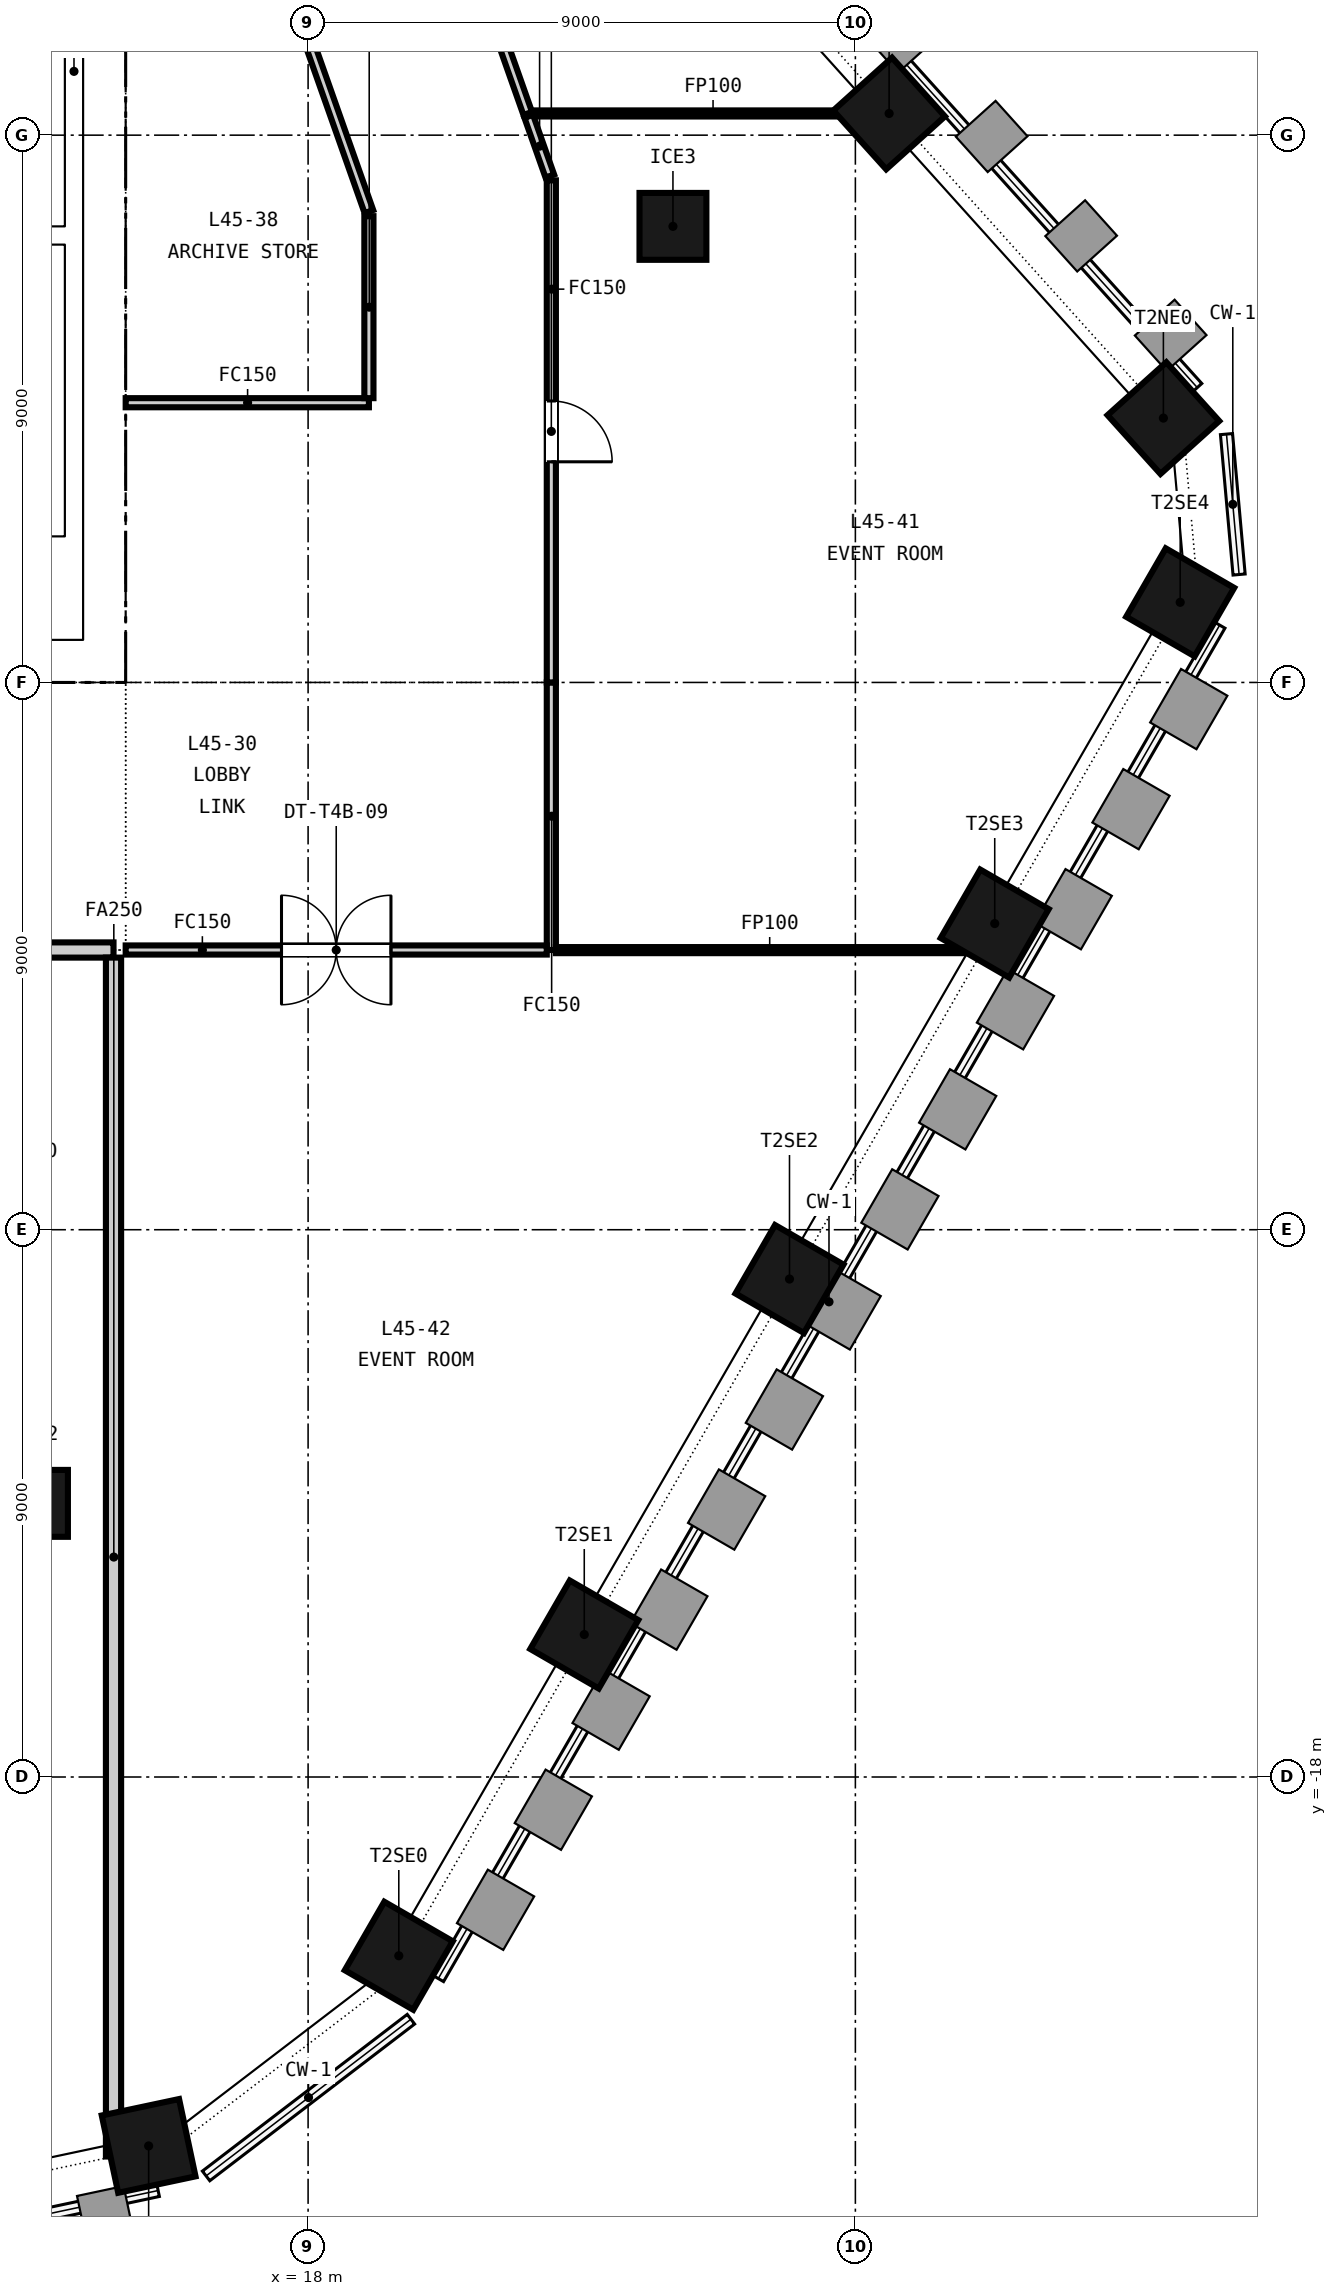
"""IFC4 building model, lengths in metres.
Left out: names, types, materials, properties, quantities, classifications, styles, units other than length and angle.
Written with IfcOpenShell. Run it as: python <this file> out.ifc"""

import sys

from ifc_helpers import new_model, si_unit, direction, frame, frame_2d, origin, origin_2d, place, context, subcontext, project, spatial, rectangle, extrude, element, fill, save


model = new_model("IFC4")
c1 = context("Model", 3, precision=1e-05, world=origin(), true_north=direction((0.0, 1.0)))
c2 = subcontext(c1, "Body", "Model", "MODEL_VIEW")
j1 = project(units=[si_unit("LENGTHUNIT", "METRE"), si_unit("PLANEANGLEUNIT", "RADIAN")], contexts=[c1])
p1 = place(None, origin())
s1 = spatial("IfcSite", under=j1, at=p1, CompositionType="ELEMENT")
p2 = place(p1, origin())
s2 = spatial("IfcBuilding", under=s1, at=p2, CompositionType="ELEMENT")
p3 = place(p2, frame((0.0, 0.0, 181.75)))
s3 = spatial("IfcBuildingStorey", under=s2, at=p3, CompositionType="ELEMENT", Elevation=181.75)
p4 = place(p3, frame((-15.0, 0.35, -0.15), z_axis=(0.0, 0.0, 1.0), x_axis=(1.0, 0.0, 0.0)))
e1 = element("IfcWall", 1, at=p4, inside=s3, PredefinedType="SOLIDWALL", context=c2, shape_type="SweptSolid", body=[
    extrude(rectangle(XDim=30.0, YDim=0.7, at=frame_2d((15.0, 0.0))), origin(), (0.0, 0.0, 1.0), 3.65),
])
p5 = place(p4, frame((5.8, 0.0, 0.15)))
e2 = element("IfcOpeningElement", 2, at=p5, cuts=e1, PredefinedType="OPENING", context=c2, shape_type="SweptSolid", body=[
    extrude(rectangle(XDim=2.4, YDim=2.4, at=frame_2d((1.2, 1.2))), frame((0.0, 0.36, 0.0), z_axis=(0.0, -1.0, 0.0), x_axis=(1.0, 0.0, 0.0)), (0.0, 0.0, 1.0), 0.72),
])
p6 = place(p4, frame((13.8, 0.0, 0.15)))
e3 = element("IfcOpeningElement", 3, at=p6, cuts=e1, PredefinedType="OPENING", context=c2, shape_type="SweptSolid", body=[
    extrude(rectangle(XDim=2.4, YDim=2.4, at=frame_2d((1.2, 1.2))), frame((0.0, 0.36, 0.0), z_axis=(0.0, -1.0, 0.0), x_axis=(1.0, 0.0, 0.0)), (0.0, 0.0, 1.0), 0.72),
])
p7 = place(p4, frame((21.8, 0.0, 0.15)))
e4 = element("IfcOpeningElement", 4, at=p7, cuts=e1, PredefinedType="OPENING", context=c2, shape_type="SweptSolid", body=[
    extrude(rectangle(XDim=2.4, YDim=2.4, at=frame_2d((1.2, 1.2))), frame((0.0, 0.36, 0.0), z_axis=(0.0, -1.0, 0.0), x_axis=(1.0, 0.0, 0.0)), (0.0, 0.0, 1.0), 0.72),
])
p8 = place(p4, frame((1.5, 0.0, 0.15)))
e5 = element("IfcOpeningElement", 5, at=p8, cuts=e1, PredefinedType="OPENING", context=c2, shape_type="SweptSolid", body=[
    extrude(rectangle(XDim=1.2, YDim=2.1, at=frame_2d((0.6, 1.05))), frame((0.0, 0.36, 0.0), z_axis=(0.0, -1.0, 0.0), x_axis=(1.0, 0.0, 0.0)), (0.0, 0.0, 1.0), 0.72),
])
p9 = place(p4, frame((27.3, 0.0, 0.15)))
e6 = element("IfcOpeningElement", 6, at=p9, cuts=e1, PredefinedType="OPENING", context=c2, shape_type="SweptSolid", body=[
    extrude(rectangle(XDim=1.2, YDim=2.1, at=frame_2d((0.6, 1.05))), frame((0.0, 0.36, 0.0), z_axis=(0.0, -1.0, 0.0), x_axis=(1.0, 0.0, 0.0)), (0.0, 0.0, 1.0), 0.72),
])
p10 = place(p3, frame((14.65, 0.7, -0.15), z_axis=(0.0, 0.0, 1.0), x_axis=(0.0, 1.0, 0.0)))
e7 = element("IfcWall", 7, at=p10, inside=s3, PredefinedType="SOLIDWALL", context=c2, shape_type="SweptSolid", body=[
    extrude(rectangle(XDim=13.6, YDim=0.7, at=frame_2d((6.8, 0.0))), origin(), (0.0, 0.0, 1.0), 3.65),
])
for number, where, z_axis, x_axis in (
    (8, (15.378, -24.067, -0.15), (0.0, 0.0, 1.0), (0.978, 0.208, 0.0)),
    (9, (19.491, -20.94, -0.15), (0.0, 0.0, 1.0), (0.5, 0.866, 0.0)),
    (10, (22.542, -15.657, -0.15), (0.0, 0.0, 1.0), (0.5, 0.866, 0.0)),
    (11, (25.917, -9.811, -0.15), (0.0, 0.0, 1.0), (0.5, 0.866, 0.0)),
    (12, (29.292, -3.965, -0.15), (0.0, 0.0, 1.0), (0.5, 0.866, 0.0)),
    (13, (32.342, 1.318, -0.15), (0.0, 0.0, 1.0), (0.5, 0.866, 0.0)),
    (14, (32.065, 4.347, -0.15), (0.0, 0.0, 1.0), (-0.669, 0.743, 0.0)),
    (15, (27.555, 9.357, -0.15), (0.0, 0.0, 1.0), (-0.669, 0.743, 0.0)),
):
    element("IfcColumn", number, at=place(p3, frame(where, z_axis=z_axis, x_axis=x_axis)), inside=s3, PredefinedType="COLUMN", context=c2, shape_type="SweptSolid", body=[
        extrude(rectangle(XDim=1.3, YDim=1.3, at=origin_2d()), origin(), (0.0, 0.0, 1.0), 3.65),
    ])
for number, where, z_axis, x_axis in (
    (16, (13.5, -13.5, -0.15), (0.0, 0.0, 1.0), (1.0, 0.0, 0.0)),
    (17, (24.0, 7.5, -0.15), (0.0, 0.0, 1.0), (1.0, 0.0, 0.0)),
):
    element("IfcColumn", number, at=place(p3, frame(where, z_axis=z_axis, x_axis=x_axis)), inside=s3, PredefinedType="COLUMN", context=c2, shape_type="SweptSolid", body=[
        extrude(rectangle(XDim=1.1, YDim=1.1, at=origin_2d()), origin(), (0.0, 0.0, 1.0), 3.65),
    ])
p11 = place(p3, frame((11.05, 7.35, 0.0), z_axis=(0.0, 0.0, 1.0), x_axis=(1.0, 0.0, 0.0)))
e18 = element("IfcWall", 18, at=p11, inside=s3, PredefinedType="SOLIDWALL", context=c2, shape_type="SweptSolid", body=[
    extrude(rectangle(XDim=2.95, YDim=0.3, at=frame_2d((1.475, 0.0))), origin(), (0.0, 0.0, 1.0), 3.5),
])
p12 = place(p3, frame((14.15, 0.7, 0.0), z_axis=(0.0, 0.0, 1.0), x_axis=(0.0, 1.0, 0.0)))
e19 = element("IfcWall", 19, at=p12, inside=s3, PredefinedType="SOLIDWALL", context=c2, shape_type="SweptSolid", body=[
    extrude(rectangle(XDim=13.6, YDim=0.3, at=frame_2d((6.8, 0.0))), origin(), (0.0, 0.0, 1.0), 3.5),
])
p13 = place(p3, frame((14.8, -4.4, 0.0), z_axis=(0.0, 0.0, 1.0), x_axis=(-1.0, 0.0, 0.0)))
e20 = element("IfcWall", 20, at=p13, inside=s3, PredefinedType="PARTITIONING", context=c2, shape_type="SweptSolid", body=[
    extrude(rectangle(XDim=14.705, YDim=0.25, at=frame_2d((7.353, 0.0))), origin(), (0.0, 0.0, 1.0), 2.741),
])
p14 = place(p13, frame((6.452, 0.0, 0.0)))
e21 = element("IfcOpeningElement", 21, at=p14, cuts=e20, PredefinedType="OPENING", context=c2, shape_type="SweptSolid", body=[
    extrude(rectangle(XDim=1.8, YDim=2.1, at=frame_2d((0.9, 1.05))), frame((0.0, 0.135, 0.0), z_axis=(0.0, -1.0, 0.0), x_axis=(1.0, 0.0, 0.0)), (0.0, 0.0, 1.0), 0.27),
])
p15 = place(p3, frame((22.0, 0.0, 0.0), z_axis=(0.0, 0.0, 1.0), x_axis=(0.0, -1.0, 0.0)))
e22 = element("IfcWall", 22, at=p15, inside=s3, PredefinedType="PARTITIONING", context=c2, shape_type="SweptSolid", body=[
    extrude(rectangle(XDim=4.4, YDim=0.15, at=frame_2d((2.2, 0.0))), origin(), (0.0, 0.0, 1.0), 2.741),
])
p16 = place(p3, frame((21.925, -4.4, 0.0), z_axis=(0.0, 0.0, 1.0), x_axis=(-1.0, 0.0, 0.0)))
e23 = element("IfcWall", 23, at=p16, inside=s3, PredefinedType="PARTITIONING", context=c2, shape_type="SweptSolid", body=[
    extrude(rectangle(XDim=6.925, YDim=0.15, at=frame_2d((3.462, 0.0))), origin(), (0.0, 0.0, 1.0), 2.741),
])
p17 = place(p16, frame((2.562, 0.0, 0.0)))
e24 = element("IfcOpeningElement", 24, at=p17, cuts=e23, PredefinedType="OPENING", context=c2, shape_type="SweptSolid", body=[
    extrude(rectangle(XDim=1.8, YDim=2.1, at=frame_2d((0.9, 1.05))), frame((0.0, 0.085, 0.0), z_axis=(0.0, -1.0, 0.0), x_axis=(1.0, 0.0, 0.0)), (0.0, 0.0, 1.0), 0.17),
])
p18 = place(p3, frame((19.0, 7.743, 0.0), z_axis=(0.0, 0.0, 1.0), x_axis=(-0.332768168026, 0.943008667165, 0.0)))
e25 = element("IfcWall", 25, at=p18, inside=s3, PredefinedType="PARTITIONING", context=c2, shape_type="SweptSolid", body=[
    extrude(rectangle(XDim=7.621, YDim=0.15, at=frame_2d((3.81, 0.0))), origin(), (0.0, 0.0, 1.0), 2.741),
])
p19 = place(p18, frame((3.36, 0.0, 0.0)))
e26 = element("IfcOpeningElement", 26, at=p19, cuts=e25, PredefinedType="OPENING", context=c2, shape_type="SweptSolid", body=[
    extrude(rectangle(XDim=0.9, YDim=2.1, at=frame_2d((0.45, 1.05))), frame((0.0, 0.085, 0.0), z_axis=(0.0, -1.0, 0.0), x_axis=(1.0, 0.0, 0.0)), (0.0, 0.0, 1.0), 0.17),
])
p20 = place(p3, frame((22.0, 8.257, 0.0), z_axis=(0.0, 0.0, 1.0), x_axis=(0.0, -1.0, 0.0)))
e27 = element("IfcWall", 27, at=p20, inside=s3, PredefinedType="PARTITIONING", context=c2, shape_type="SweptSolid", body=[
    extrude(rectangle(XDim=8.257, YDim=0.15, at=frame_2d((4.128, 0.0))), origin(), (0.0, 0.0, 1.0), 2.741),
])
p21 = place(p20, frame((3.628, 0.0, 0.0)))
e28 = element("IfcOpeningElement", 28, at=p21, cuts=e27, PredefinedType="OPENING", context=c2, shape_type="SweptSolid", body=[
    extrude(rectangle(XDim=1.0, YDim=2.1, at=frame_2d((0.5, 1.05))), frame((0.0, 0.085, 0.0), z_axis=(0.0, -1.0, 0.0), x_axis=(1.0, 0.0, 0.0)), (0.0, 0.0, 1.0), 0.17),
])
p22 = place(p3, frame((19.757, 14.611, 0.0), z_axis=(0.0, 0.0, 1.0), x_axis=(0.332898037941, -0.942962828713, 0.0)))
e29 = element("IfcWall", 29, at=p22, inside=s3, PredefinedType="PARTITIONING", context=c2, shape_type="SweptSolid", body=[
    extrude(rectangle(XDim=5.572, YDim=0.15, at=frame_2d((2.786, 0.0))), origin(), (0.0, 0.0, 1.0), 2.741),
])
p23 = place(p3, frame((21.687, 9.357, 0.0), z_axis=(0.0, 0.0, 1.0), x_axis=(1.0, 0.0, 0.0)))
e30 = element("IfcWall", 30, at=p23, inside=s3, PredefinedType="PARTITIONING", context=c2, shape_type="SweptSolid", body=[
    extrude(rectangle(XDim=5.935, YDim=0.1, at=frame_2d((2.968, 0.0))), origin(), (0.0, 0.0, 1.0), 2.741),
])
p24 = place(p3, frame((15.0, 4.6, 0.0), z_axis=(0.0, 0.0, 1.0), x_axis=(1.0, 0.0, 0.0)))
e31 = element("IfcWall", 31, at=p24, inside=s3, PredefinedType="PARTITIONING", context=c2, shape_type="SweptSolid", body=[
    extrude(rectangle(XDim=4.0, YDim=0.15, at=frame_2d((2.0, 0.0))), origin(), (0.0, 0.0, 1.0), 2.741),
])
p25 = place(p3, frame((19.0, 4.675, 0.0), z_axis=(0.0, 0.0, 1.0), x_axis=(0.0, 1.0, 0.0)))
e32 = element("IfcWall", 32, at=p25, inside=s3, PredefinedType="PARTITIONING", context=c2, shape_type="SweptSolid", body=[
    extrude(rectangle(XDim=2.993, YDim=0.15, at=frame_2d((1.497, 0.0))), origin(), (0.0, 0.0, 1.0), 2.741),
])
p26 = place(p3, frame((21.629, 9.31, 0.0), z_axis=(0.0, 0.0, 1.0), x_axis=(0.33263618507, -0.943055230823, 0.0)))
e33 = element("IfcWall", 33, at=p26, inside=s3, PredefinedType="PARTITIONING", context=c2, shape_type="SweptSolid", body=[
    extrude(rectangle(XDim=1.042, YDim=0.15, at=frame_2d((0.521, 0.0))), origin(), (0.0, 0.0, 1.0), 2.741),
])
p27 = place(p3, frame((22.075, -4.402, 0.0), z_axis=(0.0, 0.0, 1.0), x_axis=(1.0, 0.0, 0.0)))
e34 = element("IfcWall", 34, at=p27, inside=s3, PredefinedType="PARTITIONING", context=c2, shape_type="SweptSolid", body=[
    extrude(rectangle(XDim=7.022, YDim=0.1, at=frame_2d((3.511, 0.0))), origin(), (0.0, 0.0, 1.0), 2.741),
])
p28 = place(p3, frame((14.8, -24.241, 0.0), z_axis=(0.0, 0.0, 1.0), x_axis=(0.0, 1.0, 0.0)))
e35 = element("IfcWall", 35, at=p28, inside=s3, PredefinedType="PARTITIONING", context=c2, shape_type="SweptSolid", body=[
    extrude(rectangle(XDim=19.716, YDim=0.25, at=frame_2d((9.858, 0.0))), origin(), (0.0, 0.0, 1.0), 2.741),
])
p29 = place(p21, origin())
e36 = element("IfcDoor", 36, at=p29, inside=s3, OperationType="SINGLE_SWING_RIGHT", PredefinedType="DOOR", context=c2, shape_type="SweptSolid", body=[
    extrude(rectangle(XDim=1.0, YDim=2.1, at=frame_2d((0.5, 1.05))), frame((0.0, 0.025, 0.0), z_axis=(0.0, -1.0, 0.0), x_axis=(1.0, 0.0, 0.0)), (0.0, 0.0, 1.0), 0.05),
])
fill(e28, e36)
p30 = place(p17, origin())
e37 = element("IfcDoor", 37, at=p30, inside=s3, OperationType="DOUBLE_DOOR_DOUBLE_SWING", PredefinedType="DOOR", context=c2, shape_type="SweptSolid", body=[
    extrude(rectangle(XDim=1.8, YDim=2.1, at=frame_2d((0.9, 1.05))), frame((0.0, 0.025, 0.0), z_axis=(0.0, -1.0, 0.0), x_axis=(1.0, 0.0, 0.0)), (0.0, 0.0, 1.0), 0.05),
])
fill(e24, e37)
save(model, sys.argv[1])
